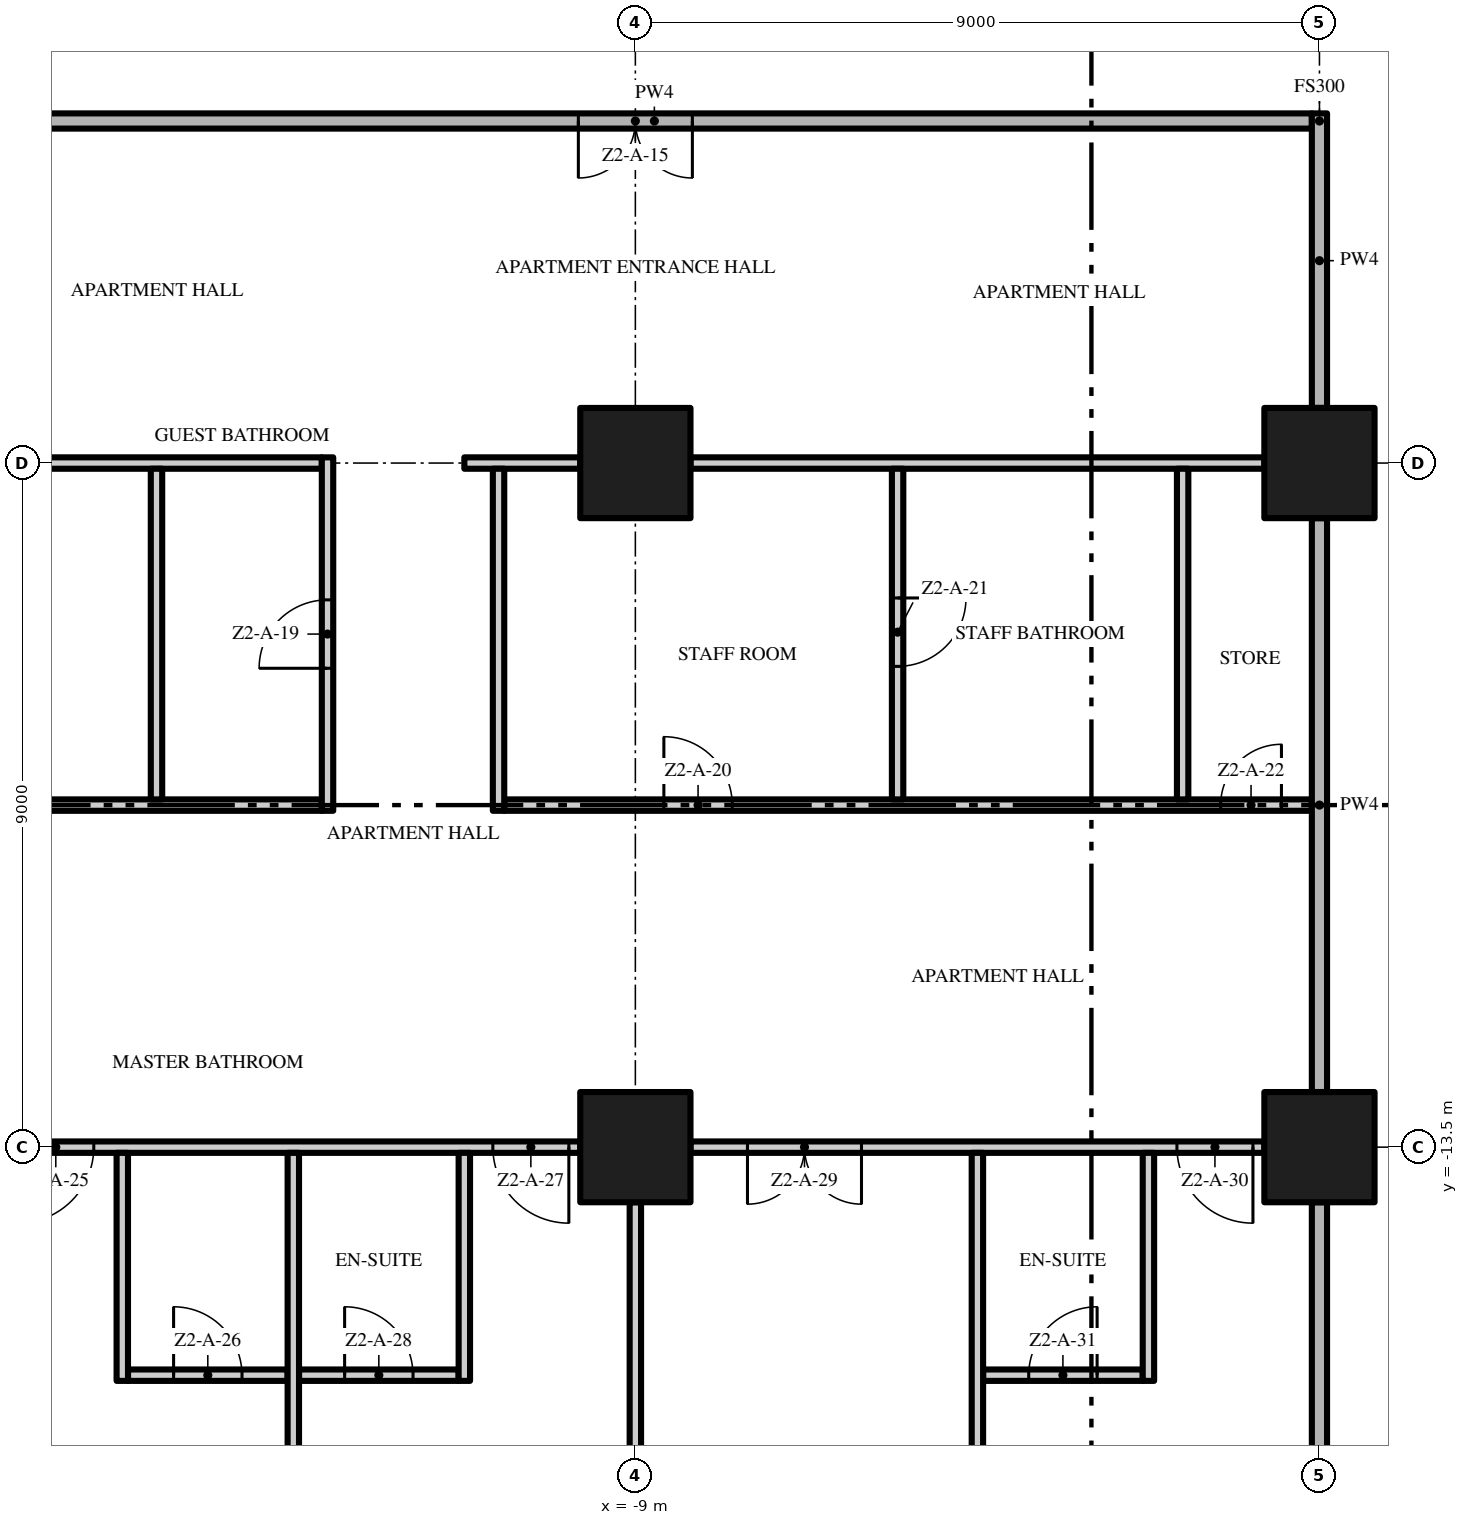
"""IFC4 building model, lengths in metres.
Left out: names, types, materials, properties, quantities, classifications, styles, units other than length and angle.
Written with IfcOpenShell. Run it as: python <this file> out.ifc"""

import sys

from ifc_helpers import new_model, si_unit, direction, frame, frame_2d, origin, origin_2d, place, context, subcontext, project, spatial, rectangle, extrude, element, fill, save


model = new_model("IFC4")
c1 = context("Model", 3, precision=1e-05, world=origin(), true_north=direction((0.0, 1.0)))
c2 = subcontext(c1, "Body", "Model", "MODEL_VIEW")
j1 = project(units=[si_unit("LENGTHUNIT", "METRE"), si_unit("PLANEANGLEUNIT", "RADIAN")], contexts=[c1])
p1 = place(None, origin())
s1 = spatial("IfcSite", under=j1, at=p1, CompositionType="ELEMENT")
p2 = place(p1, origin())
s2 = spatial("IfcBuilding", under=s1, at=p2, CompositionType="ELEMENT")
p3 = place(p2, frame((0.0, 0.0, 73.2)))
s3 = spatial("IfcBuildingStorey", under=s2, at=p3, CompositionType="ELEMENT", Elevation=73.2)
for number, where, z_axis, x_axis in (
    (1, (-9.0, -13.5, 0.0), (0.0, 0.0, 1.0), (1.0, 0.0, 0.0)),
    (2, (-9.0, -4.5, 0.0), (0.0, 0.0, 1.0), (1.0, 0.0, 0.0)),
    (3, (0.0, -13.5, 0.0), (0.0, 0.0, 1.0), (1.0, 0.0, 0.0)),
    (4, (0.0, -4.5, 0.0), (0.0, 0.0, 1.0), (1.0, 0.0, 0.0)),
):
    element("IfcColumn", number, at=place(p3, frame(where, z_axis=z_axis, x_axis=x_axis)), inside=s3, PredefinedType="COLUMN", context=c2, shape_type="SweptSolid", body=[
        extrude(rectangle(XDim=1.45, YDim=1.45, at=origin_2d()), origin(), (0.0, 0.0, 1.0), 3.5),
    ])
p4 = place(p3, frame((-15.675, -16.5, 0.0), z_axis=(0.0, 0.0, 1.0), x_axis=(1.0, 0.0, 0.0)))
e5 = element("IfcWall", 5, at=p4, inside=s3, PredefinedType="PARTITIONING", context=c2, shape_type="SweptSolid", body=[
    extrude(rectangle(XDim=2.1, YDim=0.15, at=frame_2d((1.05, 0.0))), origin(), (0.0, 0.0, 1.0), 3.5),
])
p5 = place(p4, frame((0.6, 0.0, 0.0)))
e6 = element("IfcOpeningElement", 6, at=p5, cuts=e5, PredefinedType="OPENING", context=c2, shape_type="SweptSolid", body=[
    extrude(rectangle(XDim=0.9, YDim=2.1, at=frame_2d((0.45, 1.05))), frame((0.0, 0.085, 0.0), z_axis=(0.0, -1.0, 0.0), x_axis=(1.0, 0.0, 0.0)), (0.0, 0.0, 1.0), 0.17),
])
p6 = place(p3, frame((-13.425, -16.5, 0.0), z_axis=(0.0, 0.0, 1.0), x_axis=(1.0, 0.0, 0.0)))
e7 = element("IfcWall", 7, at=p6, inside=s3, PredefinedType="PARTITIONING", context=c2, shape_type="SweptSolid", body=[
    extrude(rectangle(XDim=2.1, YDim=0.15, at=frame_2d((1.05, 0.0))), origin(), (0.0, 0.0, 1.0), 3.5),
])
p7 = place(p6, frame((0.6, 0.0, 0.0)))
e8 = element("IfcOpeningElement", 8, at=p7, cuts=e7, PredefinedType="OPENING", context=c2, shape_type="SweptSolid", body=[
    extrude(rectangle(XDim=0.9, YDim=2.1, at=frame_2d((0.45, 1.05))), frame((0.0, 0.085, 0.0), z_axis=(0.0, -1.0, 0.0), x_axis=(1.0, 0.0, 0.0)), (0.0, 0.0, 1.0), 0.17),
])
p8 = place(p3, frame((-4.425, -16.5, 0.0), z_axis=(0.0, 0.0, 1.0), x_axis=(1.0, 0.0, 0.0)))
e9 = element("IfcWall", 9, at=p8, inside=s3, PredefinedType="PARTITIONING", context=c2, shape_type="SweptSolid", body=[
    extrude(rectangle(XDim=2.1, YDim=0.15, at=frame_2d((1.05, 0.0))), origin(), (0.0, 0.0, 1.0), 3.5),
])
p9 = place(p8, frame((0.6, 0.0, 0.0)))
e10 = element("IfcOpeningElement", 10, at=p9, cuts=e9, PredefinedType="OPENING", context=c2, shape_type="SweptSolid", body=[
    extrude(rectangle(XDim=0.9, YDim=2.1, at=frame_2d((0.45, 1.05))), frame((0.0, 0.085, 0.0), z_axis=(0.0, -1.0, 0.0), x_axis=(1.0, 0.0, 0.0)), (0.0, 0.0, 1.0), 0.17),
])
p10 = place(p3, frame((-9.725, -13.5, 0.0), z_axis=(0.0, 0.0, 1.0), x_axis=(-1.0, 0.0, 0.0)))
e11 = element("IfcWall", 11, at=p10, inside=s3, PredefinedType="PARTITIONING", context=c2, shape_type="SweptSolid", body=[
    extrude(rectangle(XDim=7.55, YDim=0.15, at=frame_2d((3.775, 0.0))), origin(), (0.0, 0.0, 1.0), 3.5),
])
p11 = place(p10, frame((6.4, 0.0, 0.0)))
e12 = element("IfcOpeningElement", 12, at=p11, cuts=e11, PredefinedType="OPENING", context=c2, shape_type="SweptSolid", body=[
    extrude(rectangle(XDim=1.0, YDim=2.4, at=frame_2d((0.5, 1.2))), frame((0.0, 0.085, 0.0), z_axis=(0.0, -1.0, 0.0), x_axis=(1.0, 0.0, 0.0)), (0.0, 0.0, 1.0), 0.17),
])
p12 = place(p10, frame((0.15, 0.0, 0.0)))
e13 = element("IfcOpeningElement", 13, at=p12, cuts=e11, PredefinedType="OPENING", context=c2, shape_type="SweptSolid", body=[
    extrude(rectangle(XDim=1.0, YDim=2.4, at=frame_2d((0.5, 1.2))), frame((0.0, 0.085, 0.0), z_axis=(0.0, -1.0, 0.0), x_axis=(1.0, 0.0, 0.0)), (0.0, 0.0, 1.0), 0.17),
])
p13 = place(p3, frame((-0.725, -13.5, 0.0), z_axis=(0.0, 0.0, 1.0), x_axis=(-1.0, 0.0, 0.0)))
e14 = element("IfcWall", 14, at=p13, inside=s3, PredefinedType="PARTITIONING", context=c2, shape_type="SweptSolid", body=[
    extrude(rectangle(XDim=7.55, YDim=0.15, at=frame_2d((3.775, 0.0))), origin(), (0.0, 0.0, 1.0), 3.5),
])
p14 = place(p13, frame((5.3, 0.0, 0.0)))
e15 = element("IfcOpeningElement", 15, at=p14, cuts=e14, PredefinedType="OPENING", context=c2, shape_type="SweptSolid", body=[
    extrude(rectangle(XDim=1.5, YDim=2.4, at=frame_2d((0.75, 1.2))), frame((0.0, 0.085, 0.0), z_axis=(0.0, -1.0, 0.0), x_axis=(1.0, 0.0, 0.0)), (0.0, 0.0, 1.0), 0.17),
])
p15 = place(p13, frame((0.15, 0.0, 0.0)))
e16 = element("IfcOpeningElement", 16, at=p15, cuts=e14, PredefinedType="OPENING", context=c2, shape_type="SweptSolid", body=[
    extrude(rectangle(XDim=1.0, YDim=2.4, at=frame_2d((0.5, 1.2))), frame((0.0, 0.085, 0.0), z_axis=(0.0, -1.0, 0.0), x_axis=(1.0, 0.0, 0.0)), (0.0, 0.0, 1.0), 0.17),
])
p16 = place(p3, frame((-26.7, -9.0, 0.0), z_axis=(0.0, 0.0, 1.0), x_axis=(1.0, 0.0, 0.0)))
e17 = element("IfcWall", 17, at=p16, inside=s3, PredefinedType="PARTITIONING", context=c2, shape_type="SweptSolid", body=[
    extrude(rectangle(XDim=13.575, YDim=0.15, at=frame_2d((6.787, 0.0))), origin(), (0.0, 0.0, 1.0), 3.5),
])
p17 = place(p3, frame((-10.725, -9.0, 0.0), z_axis=(0.0, 0.0, 1.0), x_axis=(1.0, 0.0, 0.0)))
e18 = element("IfcWall", 18, at=p17, inside=s3, PredefinedType="PARTITIONING", context=c2, shape_type="SweptSolid", body=[
    extrude(rectangle(XDim=10.625, YDim=0.15, at=frame_2d((5.312, 0.0))), origin(), (0.0, 0.0, 1.0), 3.5),
])
p18 = place(p17, frame((2.1, 0.0, 0.0)))
e19 = element("IfcOpeningElement", 19, at=p18, cuts=e18, PredefinedType="OPENING", context=c2, shape_type="SweptSolid", body=[
    extrude(rectangle(XDim=0.9, YDim=2.1, at=frame_2d((0.45, 1.05))), frame((0.0, 0.085, 0.0), z_axis=(0.0, -1.0, 0.0), x_axis=(1.0, 0.0, 0.0)), (0.0, 0.0, 1.0), 0.17),
])
p19 = place(p17, frame((9.425, 0.0, 0.0)))
e20 = element("IfcOpeningElement", 20, at=p19, cuts=e18, PredefinedType="OPENING", context=c2, shape_type="SweptSolid", body=[
    extrude(rectangle(XDim=0.8, YDim=2.0, at=frame_2d((0.4, 1.0))), frame((0.0, 0.085, 0.0), z_axis=(0.0, -1.0, 0.0), x_axis=(1.0, 0.0, 0.0)), (0.0, 0.0, 1.0), 0.17),
])
p20 = place(p3, frame((-17.275, -4.5, 0.0), z_axis=(0.0, 0.0, 1.0), x_axis=(1.0, 0.0, 0.0)))
e21 = element("IfcWall", 21, at=p20, inside=s3, PredefinedType="PARTITIONING", context=c2, shape_type="SweptSolid", body=[
    extrude(rectangle(XDim=4.15, YDim=0.15, at=frame_2d((2.075, 0.0))), origin(), (0.0, 0.0, 1.0), 3.5),
])
p21 = place(p3, frame((-11.25, -4.5, 0.0), z_axis=(0.0, 0.0, 1.0), x_axis=(1.0, 0.0, 0.0)))
e22 = element("IfcWall", 22, at=p21, inside=s3, PredefinedType="PARTITIONING", context=c2, shape_type="SweptSolid", body=[
    extrude(rectangle(XDim=1.525, YDim=0.15, at=frame_2d((0.762, 0.0))), origin(), (0.0, 0.0, 1.0), 3.5),
])
p22 = place(p3, frame((-8.275, -4.5, 0.0), z_axis=(0.0, 0.0, 1.0), x_axis=(1.0, 0.0, 0.0)))
e23 = element("IfcWall", 23, at=p22, inside=s3, PredefinedType="PARTITIONING", context=c2, shape_type="SweptSolid", body=[
    extrude(rectangle(XDim=7.55, YDim=0.15, at=frame_2d((3.775, 0.0))), origin(), (0.0, 0.0, 1.0), 3.5),
])
p23 = place(p3, frame((-0.1, 0.0, 0.0), z_axis=(0.0, 0.0, 1.0), x_axis=(-1.0, 0.0, 0.0)))
e24 = element("IfcWall", 24, at=p23, inside=s3, PredefinedType="PARTITIONING", context=c2, shape_type="SweptSolid", body=[
    extrude(rectangle(XDim=17.3, YDim=0.2, at=frame_2d((8.65, 0.0))), origin(), (0.0, 0.0, 1.0), 3.5),
])
p24 = place(p23, frame((8.15, 0.0, 0.0)))
e25 = element("IfcOpeningElement", 25, at=p24, cuts=e24, PredefinedType="OPENING", context=c2, shape_type="SweptSolid", body=[
    extrude(rectangle(XDim=1.5, YDim=2.4, at=frame_2d((0.75, 1.2))), frame((0.0, 0.11, 0.0), z_axis=(0.0, -1.0, 0.0), x_axis=(1.0, 0.0, 0.0)), (0.0, 0.0, 1.0), 0.22),
])
p25 = place(p3, frame((-15.75, -16.575, 0.0), z_axis=(0.0, 0.0, 1.0), x_axis=(0.0, 1.0, 0.0)))
e26 = element("IfcWall", 26, at=p25, inside=s3, PredefinedType="PARTITIONING", context=c2, shape_type="SweptSolid", body=[
    extrude(rectangle(XDim=3.0, YDim=0.15, at=frame_2d((1.5, 0.0))), origin(), (0.0, 0.0, 1.0), 3.5),
])
p26 = place(p3, frame((-15.3, -8.925, 0.0), z_axis=(0.0, 0.0, 1.0), x_axis=(0.0, 1.0, 0.0)))
e27 = element("IfcWall", 27, at=p26, inside=s3, PredefinedType="PARTITIONING", context=c2, shape_type="SweptSolid", body=[
    extrude(rectangle(XDim=4.35, YDim=0.15, at=frame_2d((2.175, 0.0))), origin(), (0.0, 0.0, 1.0), 3.5),
])
p27 = place(p3, frame((-13.5, -22.2, 0.0), z_axis=(0.0, 0.0, 1.0), x_axis=(0.0, 1.0, 0.0)))
e28 = element("IfcWall", 28, at=p27, inside=s3, PredefinedType="PARTITIONING", context=c2, shape_type="SweptSolid", body=[
    extrude(rectangle(XDim=8.625, YDim=0.15, at=frame_2d((4.312, 0.0))), origin(), (0.0, 0.0, 1.0), 3.5),
])
p28 = place(p3, frame((-13.05, -9.075, 0.0), z_axis=(0.0, 0.0, 1.0), x_axis=(0.0, 1.0, 0.0)))
e29 = element("IfcWall", 29, at=p28, inside=s3, PredefinedType="PARTITIONING", context=c2, shape_type="SweptSolid", body=[
    extrude(rectangle(XDim=4.65, YDim=0.15, at=frame_2d((2.325, 0.0))), origin(), (0.0, 0.0, 1.0), 3.5),
])
p29 = place(p28, frame((1.875, 0.0, 0.0)))
e30 = element("IfcOpeningElement", 30, at=p29, cuts=e29, PredefinedType="OPENING", context=c2, shape_type="SweptSolid", body=[
    extrude(rectangle(XDim=0.9, YDim=2.1, at=frame_2d((0.45, 1.05))), frame((0.0, 0.085, 0.0), z_axis=(0.0, -1.0, 0.0), x_axis=(1.0, 0.0, 0.0)), (0.0, 0.0, 1.0), 0.17),
])
p30 = place(p3, frame((-11.25, -16.575, 0.0), z_axis=(0.0, 0.0, 1.0), x_axis=(0.0, 1.0, 0.0)))
e31 = element("IfcWall", 31, at=p30, inside=s3, PredefinedType="PARTITIONING", context=c2, shape_type="SweptSolid", body=[
    extrude(rectangle(XDim=3.0, YDim=0.15, at=frame_2d((1.5, 0.0))), origin(), (0.0, 0.0, 1.0), 3.5),
])
p31 = place(p3, frame((-10.8, -9.075, 0.0), z_axis=(0.0, 0.0, 1.0), x_axis=(0.0, 1.0, 0.0)))
e32 = element("IfcWall", 32, at=p31, inside=s3, PredefinedType="PARTITIONING", context=c2, shape_type="SweptSolid", body=[
    extrude(rectangle(XDim=4.5, YDim=0.15, at=frame_2d((2.25, 0.0))), origin(), (0.0, 0.0, 1.0), 3.5),
])
p32 = place(p3, frame((-9.0, -21.15, 0.0), z_axis=(0.0, 0.0, 1.0), x_axis=(0.0, 1.0, 0.0)))
e33 = element("IfcWall", 33, at=p32, inside=s3, PredefinedType="PARTITIONING", context=c2, shape_type="SweptSolid", body=[
    extrude(rectangle(XDim=6.925, YDim=0.15, at=frame_2d((3.462, 0.0))), origin(), (0.0, 0.0, 1.0), 3.5),
])
p33 = place(p3, frame((-5.55, -4.575, 0.0), z_axis=(0.0, 0.0, 1.0), x_axis=(0.0, -1.0, 0.0)))
e34 = element("IfcWall", 34, at=p33, inside=s3, PredefinedType="PARTITIONING", context=c2, shape_type="SweptSolid", body=[
    extrude(rectangle(XDim=4.35, YDim=0.15, at=frame_2d((2.175, 0.0))), origin(), (0.0, 0.0, 1.0), 3.5),
])
p34 = place(p33, frame((1.7, 0.0, 0.0)))
e35 = element("IfcOpeningElement", 35, at=p34, cuts=e34, PredefinedType="OPENING", context=c2, shape_type="SweptSolid", body=[
    extrude(rectangle(XDim=0.9, YDim=2.1, at=frame_2d((0.45, 1.05))), frame((0.0, 0.085, 0.0), z_axis=(0.0, -1.0, 0.0), x_axis=(1.0, 0.0, 0.0)), (0.0, 0.0, 1.0), 0.17),
])
p35 = place(p3, frame((-4.5, -22.2, 0.0), z_axis=(0.0, 0.0, 1.0), x_axis=(0.0, 1.0, 0.0)))
e36 = element("IfcWall", 36, at=p35, inside=s3, PredefinedType="PARTITIONING", context=c2, shape_type="SweptSolid", body=[
    extrude(rectangle(XDim=8.625, YDim=0.15, at=frame_2d((4.312, 0.0))), origin(), (0.0, 0.0, 1.0), 3.5),
])
p36 = place(p3, frame((-2.25, -16.575, 0.0), z_axis=(0.0, 0.0, 1.0), x_axis=(0.0, 1.0, 0.0)))
e37 = element("IfcWall", 37, at=p36, inside=s3, PredefinedType="PARTITIONING", context=c2, shape_type="SweptSolid", body=[
    extrude(rectangle(XDim=3.0, YDim=0.15, at=frame_2d((1.5, 0.0))), origin(), (0.0, 0.0, 1.0), 3.5),
])
p37 = place(p3, frame((-1.8, -8.925, 0.0), z_axis=(0.0, 0.0, 1.0), x_axis=(0.0, 1.0, 0.0)))
e38 = element("IfcWall", 38, at=p37, inside=s3, PredefinedType="PARTITIONING", context=c2, shape_type="SweptSolid", body=[
    extrude(rectangle(XDim=4.35, YDim=0.15, at=frame_2d((2.175, 0.0))), origin(), (0.0, 0.0, 1.0), 3.5),
])
p38 = place(p3, frame((0.0, -21.15, 0.0), z_axis=(0.0, 0.0, 1.0), x_axis=(0.0, 1.0, 0.0)))
e39 = element("IfcWall", 39, at=p38, inside=s3, PredefinedType="PARTITIONING", context=c2, shape_type="SweptSolid", body=[
    extrude(rectangle(XDim=6.925, YDim=0.2, at=frame_2d((3.462, 0.0))), origin(), (0.0, 0.0, 1.0), 3.5),
])
p39 = place(p3, frame((0.0, -12.775, 0.0), z_axis=(0.0, 0.0, 1.0), x_axis=(0.0, 1.0, 0.0)))
e40 = element("IfcWall", 40, at=p39, inside=s3, PredefinedType="PARTITIONING", context=c2, shape_type="SweptSolid", body=[
    extrude(rectangle(XDim=7.55, YDim=0.2, at=frame_2d((3.775, 0.0))), origin(), (0.0, 0.0, 1.0), 3.5),
])
p40 = place(p3, frame((0.0, -3.775, 0.0), z_axis=(0.0, 0.0, 1.0), x_axis=(0.0, 1.0, 0.0)))
e41 = element("IfcWall", 41, at=p40, inside=s3, PredefinedType="PARTITIONING", context=c2, shape_type="SweptSolid", body=[
    extrude(rectangle(XDim=3.875, YDim=0.2, at=frame_2d((1.938, 0.0))), origin(), (0.0, 0.0, 1.0), 3.5),
])
p41 = place(p24, origin())
e42 = element("IfcDoor", 42, at=p41, inside=s3, OperationType="DOUBLE_DOOR_SINGLE_SWING", PredefinedType="DOOR", context=c2, shape_type="SweptSolid", body=[
    extrude(rectangle(XDim=1.5, YDim=2.4, at=frame_2d((0.75, 1.2))), frame((0.0, 0.025, 0.0), z_axis=(0.0, -1.0, 0.0), x_axis=(1.0, 0.0, 0.0)), (0.0, 0.0, 1.0), 0.05),
])
fill(e25, e42)
p42 = place(p29, origin())
e43 = element("IfcDoor", 43, at=p42, inside=s3, OperationType="SINGLE_SWING_LEFT", PredefinedType="DOOR", context=c2, shape_type="SweptSolid", body=[
    extrude(rectangle(XDim=0.9, YDim=2.1, at=frame_2d((0.45, 1.05))), frame((0.0, 0.025, 0.0), z_axis=(0.0, -1.0, 0.0), x_axis=(1.0, 0.0, 0.0)), (0.0, 0.0, 1.0), 0.05),
])
fill(e30, e43)
p43 = place(p18, origin())
e44 = element("IfcDoor", 44, at=p43, inside=s3, OperationType="SINGLE_SWING_LEFT", PredefinedType="DOOR", context=c2, shape_type="SweptSolid", body=[
    extrude(rectangle(XDim=0.9, YDim=2.1, at=frame_2d((0.45, 1.05))), frame((0.0, 0.025, 0.0), z_axis=(0.0, -1.0, 0.0), x_axis=(1.0, 0.0, 0.0)), (0.0, 0.0, 1.0), 0.05),
])
fill(e19, e44)
p44 = place(p34, origin())
e45 = element("IfcDoor", 45, at=p44, inside=s3, OperationType="SINGLE_SWING_LEFT", PredefinedType="DOOR", context=c2, shape_type="SweptSolid", body=[
    extrude(rectangle(XDim=0.9, YDim=2.1, at=frame_2d((0.45, 1.05))), frame((0.0, 0.025, 0.0), z_axis=(0.0, -1.0, 0.0), x_axis=(1.0, 0.0, 0.0)), (0.0, 0.0, 1.0), 0.05),
])
fill(e35, e45)
p45 = place(p19, origin())
e46 = element("IfcDoor", 46, at=p45, inside=s3, OperationType="SINGLE_SWING_RIGHT", PredefinedType="DOOR", context=c2, shape_type="SweptSolid", body=[
    extrude(rectangle(XDim=0.8, YDim=2.0, at=frame_2d((0.4, 1.0))), frame((0.0, 0.025, 0.0), z_axis=(0.0, -1.0, 0.0), x_axis=(1.0, 0.0, 0.0)), (0.0, 0.0, 1.0), 0.05),
])
fill(e20, e46)
p46 = place(p11, origin())
e47 = element("IfcDoor", 47, at=p46, inside=s3, OperationType="SINGLE_SWING_RIGHT", PredefinedType="DOOR", context=c2, shape_type="SweptSolid", body=[
    extrude(rectangle(XDim=1.0, YDim=2.4, at=frame_2d((0.5, 1.2))), frame((0.0, 0.025, 0.0), z_axis=(0.0, -1.0, 0.0), x_axis=(1.0, 0.0, 0.0)), (0.0, 0.0, 1.0), 0.05),
])
fill(e12, e47)
p47 = place(p5, origin())
e48 = element("IfcDoor", 48, at=p47, inside=s3, OperationType="SINGLE_SWING_LEFT", PredefinedType="DOOR", context=c2, shape_type="SweptSolid", body=[
    extrude(rectangle(XDim=0.9, YDim=2.1, at=frame_2d((0.45, 1.05))), frame((0.0, 0.025, 0.0), z_axis=(0.0, -1.0, 0.0), x_axis=(1.0, 0.0, 0.0)), (0.0, 0.0, 1.0), 0.05),
])
fill(e6, e48)
p48 = place(p12, origin())
e49 = element("IfcDoor", 49, at=p48, inside=s3, OperationType="SINGLE_SWING_LEFT", PredefinedType="DOOR", context=c2, shape_type="SweptSolid", body=[
    extrude(rectangle(XDim=1.0, YDim=2.4, at=frame_2d((0.5, 1.2))), frame((0.0, 0.025, 0.0), z_axis=(0.0, -1.0, 0.0), x_axis=(1.0, 0.0, 0.0)), (0.0, 0.0, 1.0), 0.05),
])
fill(e13, e49)
p49 = place(p7, origin())
e50 = element("IfcDoor", 50, at=p49, inside=s3, OperationType="SINGLE_SWING_LEFT", PredefinedType="DOOR", context=c2, shape_type="SweptSolid", body=[
    extrude(rectangle(XDim=0.9, YDim=2.1, at=frame_2d((0.45, 1.05))), frame((0.0, 0.025, 0.0), z_axis=(0.0, -1.0, 0.0), x_axis=(1.0, 0.0, 0.0)), (0.0, 0.0, 1.0), 0.05),
])
fill(e8, e50)
p50 = place(p14, origin())
e51 = element("IfcDoor", 51, at=p50, inside=s3, OperationType="DOUBLE_DOOR_SINGLE_SWING", PredefinedType="DOOR", context=c2, shape_type="SweptSolid", body=[
    extrude(rectangle(XDim=1.5, YDim=2.4, at=frame_2d((0.75, 1.2))), frame((0.0, 0.025, 0.0), z_axis=(0.0, -1.0, 0.0), x_axis=(1.0, 0.0, 0.0)), (0.0, 0.0, 1.0), 0.05),
])
fill(e15, e51)
p51 = place(p15, origin())
e52 = element("IfcDoor", 52, at=p51, inside=s3, OperationType="SINGLE_SWING_LEFT", PredefinedType="DOOR", context=c2, shape_type="SweptSolid", body=[
    extrude(rectangle(XDim=1.0, YDim=2.4, at=frame_2d((0.5, 1.2))), frame((0.0, 0.025, 0.0), z_axis=(0.0, -1.0, 0.0), x_axis=(1.0, 0.0, 0.0)), (0.0, 0.0, 1.0), 0.05),
])
fill(e16, e52)
p52 = place(p9, origin())
e53 = element("IfcDoor", 53, at=p52, inside=s3, OperationType="SINGLE_SWING_RIGHT", PredefinedType="DOOR", context=c2, shape_type="SweptSolid", body=[
    extrude(rectangle(XDim=0.9, YDim=2.1, at=frame_2d((0.45, 1.05))), frame((0.0, 0.025, 0.0), z_axis=(0.0, -1.0, 0.0), x_axis=(1.0, 0.0, 0.0)), (0.0, 0.0, 1.0), 0.05),
])
fill(e10, e53)
save(model, sys.argv[1])
